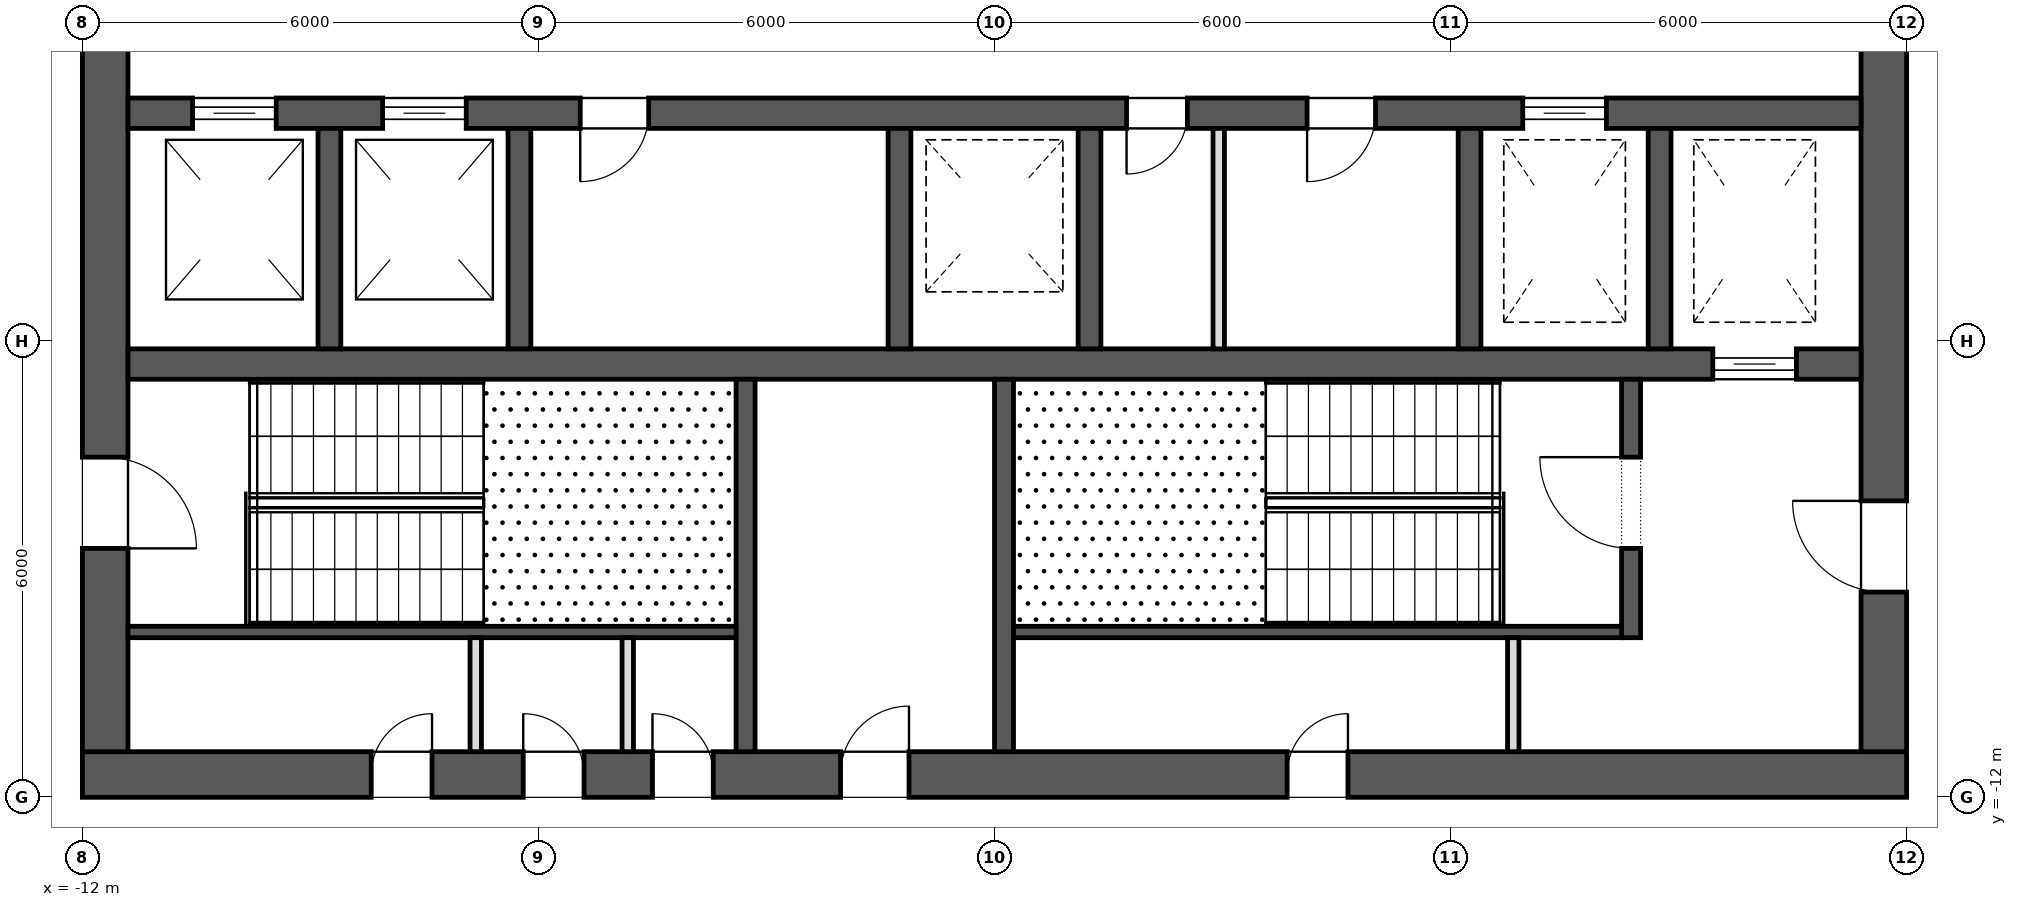
"""IFC4 building model, lengths in metres.
Left out: names, types, materials, properties, quantities, classifications, styles, units other than length and angle.
Written with IfcOpenShell. Run it as: python <this file> out.ifc"""

import sys

from ifc_helpers import new_model, si_unit, direction, frame, frame_2d, origin, place, context, subcontext, project, spatial, rectangle, extrude, element, fill, save


model = new_model("IFC4")
c1 = context("Model", 3, precision=1e-05, world=origin(), true_north=direction((0.0, 1.0)))
c2 = subcontext(c1, "Body", "Model", "MODEL_VIEW")
j1 = project(units=[si_unit("LENGTHUNIT", "METRE"), si_unit("PLANEANGLEUNIT", "RADIAN")], contexts=[c1])
p1 = place(None, origin())
s1 = spatial("IfcSite", under=j1, at=p1, CompositionType="ELEMENT")
p2 = place(p1, origin())
s2 = spatial("IfcBuilding", under=s1, at=p2, CompositionType="ELEMENT")
p3 = place(p2, frame((0.0, 0.0, 280.3)))
s3 = spatial("IfcBuildingStorey", under=s2, at=p3, CompositionType="ELEMENT", Elevation=280.3)
p4 = place(p3, frame((-12.0, -11.7, 0.0), z_axis=(0.0, 0.0, 1.0), x_axis=(1.0, 0.0, 0.0)))
e1 = element("IfcWall", 1, at=p4, inside=s3, PredefinedType="SHEAR", context=c2, shape_type="SweptSolid", body=[
    extrude(rectangle(XDim=24.0, YDim=0.6, at=frame_2d((12.0, 0.0))), origin(), (0.0, 0.0, 1.0), 4.0),
])
p5 = place(p4, frame((9.975, 0.0, 0.0)))
e2 = element("IfcOpeningElement", 2, at=p5, cuts=e1, PredefinedType="OPENING", context=c2, shape_type="SweptSolid", body=[
    extrude(rectangle(XDim=0.9, YDim=2.1, at=frame_2d((0.45, 1.05))), frame((0.0, 0.312, 0.0), z_axis=(0.0, -1.0, 0.0), x_axis=(1.0, 0.0, 0.0)), (0.0, 0.0, 1.0), 0.624),
])
p6 = place(p4, frame((3.8, 0.0, 0.0)))
e3 = element("IfcOpeningElement", 3, at=p6, cuts=e1, PredefinedType="OPENING", context=c2, shape_type="SweptSolid", body=[
    extrude(rectangle(XDim=0.8, YDim=2.1, at=frame_2d((0.4, 1.05))), frame((0.0, 0.312, 0.0), z_axis=(0.0, -1.0, 0.0), x_axis=(1.0, 0.0, 0.0)), (0.0, 0.0, 1.0), 0.624),
])
p7 = place(p4, frame((5.8, 0.0, 0.0)))
e4 = element("IfcOpeningElement", 4, at=p7, cuts=e1, PredefinedType="OPENING", context=c2, shape_type="SweptSolid", body=[
    extrude(rectangle(XDim=0.8, YDim=2.1, at=frame_2d((0.4, 1.05))), frame((0.0, 0.312, 0.0), z_axis=(0.0, -1.0, 0.0), x_axis=(1.0, 0.0, 0.0)), (0.0, 0.0, 1.0), 0.624),
])
p8 = place(p4, frame((7.5, 0.0, 0.0)))
e5 = element("IfcOpeningElement", 5, at=p8, cuts=e1, PredefinedType="OPENING", context=c2, shape_type="SweptSolid", body=[
    extrude(rectangle(XDim=0.8, YDim=2.1, at=frame_2d((0.4, 1.05))), frame((0.0, 0.312, 0.0), z_axis=(0.0, -1.0, 0.0), x_axis=(1.0, 0.0, 0.0)), (0.0, 0.0, 1.0), 0.624),
])
p9 = place(p4, frame((15.85, 0.0, 0.0)))
e6 = element("IfcOpeningElement", 6, at=p9, cuts=e1, PredefinedType="OPENING", context=c2, shape_type="SweptSolid", body=[
    extrude(rectangle(XDim=0.8, YDim=2.1, at=frame_2d((0.4, 1.05))), frame((0.0, 0.312, 0.0), z_axis=(0.0, -1.0, 0.0), x_axis=(1.0, 0.0, 0.0)), (0.0, 0.0, 1.0), 0.624),
])
p10 = place(p3, frame((11.7, -11.4, 0.0), z_axis=(0.0, 0.0, 1.0), x_axis=(0.0, 1.0, 0.0)))
e7 = element("IfcWall", 7, at=p10, inside=s3, PredefinedType="SHEAR", context=c2, shape_type="SweptSolid", body=[
    extrude(rectangle(XDim=22.8, YDim=0.6, at=frame_2d((11.4, 0.0))), origin(), (0.0, 0.0, 1.0), 4.0),
])
p11 = place(p10, frame((10.2, 0.0, 0.0)))
e8 = element("IfcOpeningElement", 8, at=p11, cuts=e7, PredefinedType="OPENING", context=c2, shape_type="SweptSolid", body=[
    extrude(rectangle(XDim=2.4, YDim=2.1, at=frame_2d((1.2, 1.05))), frame((0.0, 0.312, 0.0), z_axis=(0.0, -1.0, 0.0), x_axis=(1.0, 0.0, 0.0)), (0.0, 0.0, 1.0), 0.624),
])
p12 = place(p10, frame((19.5, 0.0, 0.0)))
e9 = element("IfcOpeningElement", 9, at=p12, cuts=e7, PredefinedType="OPENING", context=c2, shape_type="SweptSolid", body=[
    extrude(rectangle(XDim=1.2, YDim=2.1, at=frame_2d((0.6, 1.05))), frame((0.0, 0.312, 0.0), z_axis=(0.0, -1.0, 0.0), x_axis=(1.0, 0.0, 0.0)), (0.0, 0.0, 1.0), 0.624),
])
p13 = place(p10, frame((2.1, 0.0, 0.0)))
e10 = element("IfcOpeningElement", 10, at=p13, cuts=e7, PredefinedType="OPENING", context=c2, shape_type="SweptSolid", body=[
    extrude(rectangle(XDim=1.2, YDim=2.1, at=frame_2d((0.6, 1.05))), frame((0.0, 0.312, 0.0), z_axis=(0.0, -1.0, 0.0), x_axis=(1.0, 0.0, 0.0)), (0.0, 0.0, 1.0), 0.624),
])
p14 = place(p3, frame((-11.7, -11.4, 0.0), z_axis=(0.0, 0.0, 1.0), x_axis=(0.0, 1.0, 0.0)))
e11 = element("IfcWall", 11, at=p14, inside=s3, PredefinedType="SHEAR", context=c2, shape_type="SweptSolid", body=[
    extrude(rectangle(XDim=22.8, YDim=0.6, at=frame_2d((11.4, 0.0))), origin(), (0.0, 0.0, 1.0), 4.0),
])
p15 = place(p14, frame((10.2, 0.0, 0.0)))
e12 = element("IfcOpeningElement", 12, at=p15, cuts=e11, PredefinedType="OPENING", context=c2, shape_type="SweptSolid", body=[
    extrude(rectangle(XDim=2.4, YDim=2.1, at=frame_2d((1.2, 1.05))), frame((0.0, 0.312, 0.0), z_axis=(0.0, -1.0, 0.0), x_axis=(1.0, 0.0, 0.0)), (0.0, 0.0, 1.0), 0.624),
])
p16 = place(p14, frame((18.925, 0.0, 0.0)))
e13 = element("IfcOpeningElement", 13, at=p16, cuts=e11, PredefinedType="OPENING", context=c2, shape_type="SweptSolid", body=[
    extrude(rectangle(XDim=1.2, YDim=2.1, at=frame_2d((0.6, 1.05))), frame((0.0, 0.312, 0.0), z_axis=(0.0, -1.0, 0.0), x_axis=(1.0, 0.0, 0.0)), (0.0, 0.0, 1.0), 0.624),
])
p17 = place(p14, frame((2.675, 0.0, 0.0)))
e14 = element("IfcOpeningElement", 14, at=p17, cuts=e11, PredefinedType="OPENING", context=c2, shape_type="SweptSolid", body=[
    extrude(rectangle(XDim=1.2, YDim=2.1, at=frame_2d((0.6, 1.05))), frame((0.0, 0.312, 0.0), z_axis=(0.0, -1.0, 0.0), x_axis=(1.0, 0.0, 0.0)), (0.0, 0.0, 1.0), 0.624),
])
p18 = place(p3, frame((-11.4, -3.0, 0.0), z_axis=(0.0, 0.0, 1.0), x_axis=(1.0, 0.0, 0.0)))
e15 = element("IfcWall", 15, at=p18, inside=s3, PredefinedType="SHEAR", context=c2, shape_type="SweptSolid", body=[
    extrude(rectangle(XDim=22.8, YDim=0.4, at=frame_2d((11.4, 0.0))), origin(), (0.0, 0.0, 1.0), 4.0),
])
p19 = place(p18, frame((0.85, 0.0, 0.0)))
e16 = element("IfcOpeningElement", 16, at=p19, cuts=e15, PredefinedType="OPENING", context=c2, shape_type="SweptSolid", body=[
    extrude(rectangle(XDim=1.1, YDim=2.1, at=frame_2d((0.55, 1.05))), frame((0.0, 0.212, 0.0), z_axis=(0.0, -1.0, 0.0), x_axis=(1.0, 0.0, 0.0)), (0.0, 0.0, 1.0), 0.424),
])
p20 = place(p18, frame((3.35, 0.0, 0.0)))
e17 = element("IfcOpeningElement", 17, at=p20, cuts=e15, PredefinedType="OPENING", context=c2, shape_type="SweptSolid", body=[
    extrude(rectangle(XDim=1.1, YDim=2.1, at=frame_2d((0.55, 1.05))), frame((0.0, 0.212, 0.0), z_axis=(0.0, -1.0, 0.0), x_axis=(1.0, 0.0, 0.0)), (0.0, 0.0, 1.0), 0.424),
])
p21 = place(p18, frame((18.35, 0.0, 0.0)))
e18 = element("IfcOpeningElement", 18, at=p21, cuts=e15, PredefinedType="OPENING", context=c2, shape_type="SweptSolid", body=[
    extrude(rectangle(XDim=1.1, YDim=2.1, at=frame_2d((0.55, 1.05))), frame((0.0, 0.212, 0.0), z_axis=(0.0, -1.0, 0.0), x_axis=(1.0, 0.0, 0.0)), (0.0, 0.0, 1.0), 0.424),
])
p22 = place(p18, frame((13.137, 0.0, 0.0)))
e19 = element("IfcOpeningElement", 19, at=p22, cuts=e15, PredefinedType="OPENING", context=c2, shape_type="SweptSolid", body=[
    extrude(rectangle(XDim=0.8, YDim=2.1, at=frame_2d((0.4, 1.05))), frame((0.0, 0.212, 0.0), z_axis=(0.0, -1.0, 0.0), x_axis=(1.0, 0.0, 0.0)), (0.0, 0.0, 1.0), 0.424),
])
p23 = place(p18, frame((15.512, 0.0, 0.0)))
e20 = element("IfcOpeningElement", 20, at=p23, cuts=e15, PredefinedType="OPENING", context=c2, shape_type="SweptSolid", body=[
    extrude(rectangle(XDim=0.9, YDim=2.1, at=frame_2d((0.45, 1.05))), frame((0.0, 0.212, 0.0), z_axis=(0.0, -1.0, 0.0), x_axis=(1.0, 0.0, 0.0)), (0.0, 0.0, 1.0), 0.424),
])
p24 = place(p18, frame((5.95, 0.0, 0.0)))
e21 = element("IfcOpeningElement", 21, at=p24, cuts=e15, PredefinedType="OPENING", context=c2, shape_type="SweptSolid", body=[
    extrude(rectangle(XDim=0.9, YDim=2.1, at=frame_2d((0.45, 1.05))), frame((0.0, 0.212, 0.0), z_axis=(0.0, -1.0, 0.0), x_axis=(1.0, 0.0, 0.0)), (0.0, 0.0, 1.0), 0.424),
])
p25 = place(p3, frame((-11.4, -6.3, 0.0), z_axis=(0.0, 0.0, 1.0), x_axis=(1.0, 0.0, 0.0)))
e22 = element("IfcWall", 22, at=p25, inside=s3, PredefinedType="SHEAR", context=c2, shape_type="SweptSolid", body=[
    extrude(rectangle(XDim=22.8, YDim=0.4, at=frame_2d((11.4, 0.0))), origin(), (0.0, 0.0, 1.0), 4.0),
])
p26 = place(p25, frame((20.85, 0.0, 0.0)))
e23 = element("IfcOpeningElement", 23, at=p26, cuts=e22, PredefinedType="OPENING", context=c2, shape_type="SweptSolid", body=[
    extrude(rectangle(XDim=1.1, YDim=2.1, at=frame_2d((0.55, 1.05))), frame((0.0, 0.212, 0.0), z_axis=(0.0, -1.0, 0.0), x_axis=(1.0, 0.0, 0.0)), (0.0, 0.0, 1.0), 0.424),
])
for number, where, z_axis, x_axis in (
    (24, (-8.75, -6.1, 0.0), (0.0, 0.0, 1.0), (0.0, 1.0, 0.0)),
    (25, (-6.25, -6.1, 0.0), (0.0, 0.0, 1.0), (0.0, 1.0, 0.0)),
    (26, (-1.25, -6.1, 0.0), (0.0, 0.0, 1.0), (0.0, 1.0, 0.0)),
    (27, (1.25, -6.1, 0.0), (0.0, 0.0, 1.0), (0.0, 1.0, 0.0)),
    (28, (6.25, -6.1, 0.0), (0.0, 0.0, 1.0), (0.0, 1.0, 0.0)),
    (29, (8.75, -6.1, 0.0), (0.0, 0.0, 1.0), (0.0, 1.0, 0.0)),
):
    element("IfcWall", number, at=place(p3, frame(where, z_axis=z_axis, x_axis=x_axis)), inside=s3, PredefinedType="SHEAR", context=c2, shape_type="SweptSolid", body=[
        extrude(rectangle(XDim=2.9, YDim=0.3, at=frame_2d((1.45, 0.0))), origin(), (0.0, 0.0, 1.0), 4.0),
    ])
for number, where, z_axis, x_axis in (
    (30, (-3.275, -11.4, 0.0), (0.0, 0.0, 1.0), (0.0, 1.0, 0.0)),
    (31, (0.125, -11.4, 0.0), (0.0, 0.0, 1.0), (0.0, 1.0, 0.0)),
):
    element("IfcWall", number, at=place(p3, frame(where, z_axis=z_axis, x_axis=x_axis)), inside=s3, PredefinedType="SHEAR", context=c2, shape_type="SweptSolid", body=[
        extrude(rectangle(XDim=4.9, YDim=0.25, at=frame_2d((2.45, 0.0))), origin(), (0.0, 0.0, 1.0), 3.7),
    ])
p27 = place(p3, frame((8.375, -9.9, 0.0), z_axis=(0.0, 0.0, 1.0), x_axis=(0.0, 1.0, 0.0)))
e32 = element("IfcWall", 32, at=p27, inside=s3, PredefinedType="SHEAR", context=c2, shape_type="SweptSolid", body=[
    extrude(rectangle(XDim=3.4, YDim=0.25, at=frame_2d((1.7, 0.0))), origin(), (0.0, 0.0, 1.0), 3.7),
])
p28 = place(p27, frame((1.175, 0.0, 0.0)))
e33 = element("IfcOpeningElement", 33, at=p28, cuts=e32, PredefinedType="OPENING", context=c2, shape_type="SweptSolid", body=[
    extrude(rectangle(XDim=1.2, YDim=2.1, at=frame_2d((0.6, 1.05))), frame((0.0, 0.137, 0.0), z_axis=(0.0, -1.0, 0.0), x_axis=(1.0, 0.0, 0.0)), (0.0, 0.0, 1.0), 0.274),
])
for number, where, z_axis, x_axis in (
    (34, (-11.4, -9.825, 0.0), (0.0, 0.0, 1.0), (1.0, 0.0, 0.0)),
    (35, (0.25, -9.825, 0.0), (0.0, 0.0, 1.0), (1.0, 0.0, 0.0)),
):
    element("IfcWall", number, at=place(p3, frame(where, z_axis=z_axis, x_axis=x_axis)), inside=s3, PredefinedType="SHEAR", context=c2, shape_type="SweptSolid", body=[
        extrude(rectangle(XDim=8.0, YDim=0.15, at=frame_2d((4.0, 0.0))), origin(), (0.0, 0.0, 1.0), 3.7),
    ])
for number, where, z_axis, x_axis in (
    (36, (-6.825, -11.4, 0.0), (0.0, 0.0, 1.0), (0.0, 1.0, 0.0)),
    (37, (-4.825, -11.4, 0.0), (0.0, 0.0, 1.0), (0.0, 1.0, 0.0)),
    (38, (6.825, -11.4, 0.0), (0.0, 0.0, 1.0), (0.0, 1.0, 0.0)),
):
    element("IfcWall", number, at=place(p3, frame(where, z_axis=z_axis, x_axis=x_axis)), inside=s3, PredefinedType="PARTITIONING", context=c2, shape_type="SweptSolid", body=[
        extrude(rectangle(XDim=1.5, YDim=0.15, at=frame_2d((0.75, 0.0))), origin(), (0.0, 0.0, 1.0), 3.7),
    ])
p29 = place(p3, frame((2.95, -6.1, 0.0), z_axis=(0.0, 0.0, 1.0), x_axis=(0.0, 1.0, 0.0)))
e39 = element("IfcWall", 39, at=p29, inside=s3, PredefinedType="PARTITIONING", context=c2, shape_type="SweptSolid", body=[
    extrude(rectangle(XDim=2.9, YDim=0.15, at=frame_2d((1.45, 0.0))), origin(), (0.0, 0.0, 1.0), 3.7),
])
p30 = place(p26, origin())
e40 = element("IfcDoor", 40, at=p30, inside=s3, OperationType="SLIDING_TO_LEFT", PredefinedType="DOOR", context=c2, shape_type="SweptSolid", body=[
    extrude(rectangle(XDim=1.1, YDim=2.1, at=frame_2d((0.55, 1.05))), frame((0.0, 0.025, 0.0), z_axis=(0.0, -1.0, 0.0), x_axis=(1.0, 0.0, 0.0)), (0.0, 0.0, 1.0), 0.05),
])
fill(e23, e40)
p31 = place(p19, origin())
e41 = element("IfcDoor", 41, at=p31, inside=s3, OperationType="SLIDING_TO_LEFT", PredefinedType="DOOR", context=c2, shape_type="SweptSolid", body=[
    extrude(rectangle(XDim=1.1, YDim=2.1, at=frame_2d((0.55, 1.05))), frame((0.0, 0.025, 0.0), z_axis=(0.0, -1.0, 0.0), x_axis=(1.0, 0.0, 0.0)), (0.0, 0.0, 1.0), 0.05),
])
fill(e16, e41)
p32 = place(p20, origin())
e42 = element("IfcDoor", 42, at=p32, inside=s3, OperationType="SLIDING_TO_LEFT", PredefinedType="DOOR", context=c2, shape_type="SweptSolid", body=[
    extrude(rectangle(XDim=1.1, YDim=2.1, at=frame_2d((0.55, 1.05))), frame((0.0, 0.025, 0.0), z_axis=(0.0, -1.0, 0.0), x_axis=(1.0, 0.0, 0.0)), (0.0, 0.0, 1.0), 0.05),
])
fill(e17, e42)
p33 = place(p21, origin())
e43 = element("IfcDoor", 43, at=p33, inside=s3, OperationType="SLIDING_TO_LEFT", PredefinedType="DOOR", context=c2, shape_type="SweptSolid", body=[
    extrude(rectangle(XDim=1.1, YDim=2.1, at=frame_2d((0.55, 1.05))), frame((0.0, 0.025, 0.0), z_axis=(0.0, -1.0, 0.0), x_axis=(1.0, 0.0, 0.0)), (0.0, 0.0, 1.0), 0.05),
])
fill(e18, e43)
p34 = place(p17, frame((1.2, 0.0, 0.0), z_axis=(0.0, 0.0, 1.0), x_axis=(-1.0, 0.0, 0.0)))
e44 = element("IfcDoor", 44, at=p34, inside=s3, OperationType="SINGLE_SWING_LEFT", PredefinedType="DOOR", context=c2, shape_type="SweptSolid", body=[
    extrude(rectangle(XDim=1.2, YDim=2.1, at=frame_2d((0.6, 1.05))), frame((0.0, 0.025, 0.0), z_axis=(0.0, -1.0, 0.0), x_axis=(1.0, 0.0, 0.0)), (0.0, 0.0, 1.0), 0.05),
])
fill(e14, e44)
p35 = place(p28, origin())
e45 = element("IfcDoor", 45, at=p35, inside=s3, OperationType="SINGLE_SWING_LEFT", PredefinedType="DOOR", context=c2, shape_type="SweptSolid", body=[
    extrude(rectangle(XDim=1.2, YDim=2.1, at=frame_2d((0.6, 1.05))), frame((0.0, 0.025, 0.0), z_axis=(0.0, -1.0, 0.0), x_axis=(1.0, 0.0, 0.0)), (0.0, 0.0, 1.0), 0.05),
])
fill(e33, e45)
p36 = place(p13, origin())
e46 = element("IfcDoor", 46, at=p36, inside=s3, OperationType="SINGLE_SWING_LEFT", PredefinedType="DOOR", context=c2, shape_type="SweptSolid", body=[
    extrude(rectangle(XDim=1.2, YDim=2.1, at=frame_2d((0.6, 1.05))), frame((0.0, 0.025, 0.0), z_axis=(0.0, -1.0, 0.0), x_axis=(1.0, 0.0, 0.0)), (0.0, 0.0, 1.0), 0.05),
])
fill(e10, e46)
p37 = place(p5, origin())
e47 = element("IfcDoor", 47, at=p37, inside=s3, OperationType="SINGLE_SWING_LEFT", PredefinedType="DOOR", context=c2, shape_type="SweptSolid", body=[
    extrude(rectangle(XDim=0.9, YDim=2.1, at=frame_2d((0.45, 1.05))), frame((0.0, 0.025, 0.0), z_axis=(0.0, -1.0, 0.0), x_axis=(1.0, 0.0, 0.0)), (0.0, 0.0, 1.0), 0.05),
])
fill(e2, e47)
p38 = place(p6, origin())
e48 = element("IfcDoor", 48, at=p38, inside=s3, OperationType="SINGLE_SWING_LEFT", PredefinedType="DOOR", context=c2, shape_type="SweptSolid", body=[
    extrude(rectangle(XDim=0.8, YDim=2.1, at=frame_2d((0.4, 1.05))), frame((0.0, 0.025, 0.0), z_axis=(0.0, -1.0, 0.0), x_axis=(1.0, 0.0, 0.0)), (0.0, 0.0, 1.0), 0.05),
])
fill(e3, e48)
p39 = place(p7, origin())
e49 = element("IfcDoor", 49, at=p39, inside=s3, OperationType="SINGLE_SWING_RIGHT", PredefinedType="DOOR", context=c2, shape_type="SweptSolid", body=[
    extrude(rectangle(XDim=0.8, YDim=2.1, at=frame_2d((0.4, 1.05))), frame((0.0, 0.025, 0.0), z_axis=(0.0, -1.0, 0.0), x_axis=(1.0, 0.0, 0.0)), (0.0, 0.0, 1.0), 0.05),
])
fill(e4, e49)
p40 = place(p8, origin())
e50 = element("IfcDoor", 50, at=p40, inside=s3, OperationType="SINGLE_SWING_RIGHT", PredefinedType="DOOR", context=c2, shape_type="SweptSolid", body=[
    extrude(rectangle(XDim=0.8, YDim=2.1, at=frame_2d((0.4, 1.05))), frame((0.0, 0.025, 0.0), z_axis=(0.0, -1.0, 0.0), x_axis=(1.0, 0.0, 0.0)), (0.0, 0.0, 1.0), 0.05),
])
fill(e5, e50)
p41 = place(p9, origin())
e51 = element("IfcDoor", 51, at=p41, inside=s3, OperationType="SINGLE_SWING_LEFT", PredefinedType="DOOR", context=c2, shape_type="SweptSolid", body=[
    extrude(rectangle(XDim=0.8, YDim=2.1, at=frame_2d((0.4, 1.05))), frame((0.0, 0.025, 0.0), z_axis=(0.0, -1.0, 0.0), x_axis=(1.0, 0.0, 0.0)), (0.0, 0.0, 1.0), 0.05),
])
fill(e6, e51)
p42 = place(p22, frame((0.8, 0.0, 0.0), z_axis=(0.0, 0.0, 1.0), x_axis=(-1.0, 0.0, 0.0)))
e52 = element("IfcDoor", 52, at=p42, inside=s3, OperationType="SINGLE_SWING_LEFT", PredefinedType="DOOR", context=c2, shape_type="SweptSolid", body=[
    extrude(rectangle(XDim=0.8, YDim=2.1, at=frame_2d((0.4, 1.05))), frame((0.0, 0.025, 0.0), z_axis=(0.0, -1.0, 0.0), x_axis=(1.0, 0.0, 0.0)), (0.0, 0.0, 1.0), 0.05),
])
fill(e19, e52)
p43 = place(p23, frame((0.9, 0.0, 0.0), z_axis=(0.0, 0.0, 1.0), x_axis=(-1.0, 0.0, 0.0)))
e53 = element("IfcDoor", 53, at=p43, inside=s3, OperationType="SINGLE_SWING_LEFT", PredefinedType="DOOR", context=c2, shape_type="SweptSolid", body=[
    extrude(rectangle(XDim=0.9, YDim=2.1, at=frame_2d((0.45, 1.05))), frame((0.0, 0.025, 0.0), z_axis=(0.0, -1.0, 0.0), x_axis=(1.0, 0.0, 0.0)), (0.0, 0.0, 1.0), 0.05),
])
fill(e20, e53)
p44 = place(p24, frame((0.9, 0.0, 0.0), z_axis=(0.0, 0.0, 1.0), x_axis=(-1.0, 0.0, 0.0)))
e54 = element("IfcDoor", 54, at=p44, inside=s3, OperationType="SINGLE_SWING_LEFT", PredefinedType="DOOR", context=c2, shape_type="SweptSolid", body=[
    extrude(rectangle(XDim=0.9, YDim=2.1, at=frame_2d((0.45, 1.05))), frame((0.0, 0.025, 0.0), z_axis=(0.0, -1.0, 0.0), x_axis=(1.0, 0.0, 0.0)), (0.0, 0.0, 1.0), 0.05),
])
fill(e21, e54)
save(model, sys.argv[1])
